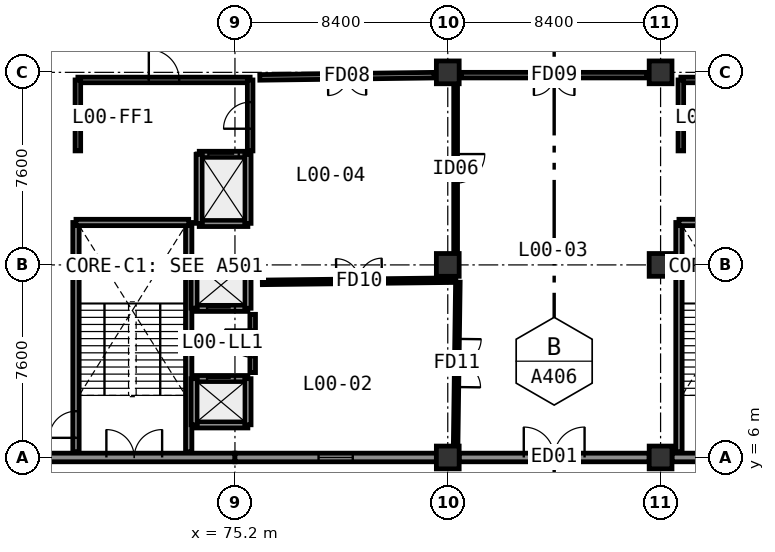
"""IFC4 building model, lengths in metres.
Left out: names, types, materials, properties, quantities, classifications, styles, units other than length and angle.
Written with IfcOpenShell. Run it as: python <this file> out.ifc"""

import sys

from ifc_helpers import new_model, si_unit, direction, frame, frame_2d, origin, origin_2d, place, context, subcontext, project, spatial, rectangle, extrude, element, fill, save


model = new_model("IFC4")
c1 = context("Model", 3, precision=1e-05, world=origin(), true_north=direction((0.0, 1.0)))
c2 = subcontext(c1, "Body", "Model", "MODEL_VIEW")
j1 = project(units=[si_unit("LENGTHUNIT", "METRE"), si_unit("PLANEANGLEUNIT", "RADIAN")], contexts=[c1])
p1 = place(None, origin())
s1 = spatial("IfcSite", under=j1, at=p1, CompositionType="ELEMENT")
p2 = place(p1, origin())
s2 = spatial("IfcBuilding", under=s1, at=p2, CompositionType="ELEMENT")
p3 = place(p2, origin())
s3 = spatial("IfcBuildingStorey", under=s2, at=p3, CompositionType="ELEMENT", Elevation=0.0)
for number, where, z_axis, x_axis in (
    (1, (83.6, 6.0, 0.0), (0.0, 0.0, 1.0), (1.0, 0.0, 0.0)),
    (2, (92.0, 6.0, 0.0), (0.0, 0.0, 1.0), (1.0, 0.0, 0.0)),
    (3, (83.6, 13.6, 0.0), (0.0, 0.0, 1.0), (1.0, 0.0, 0.0)),
    (4, (92.0, 13.6, 0.0), (0.0, 0.0, 1.0), (1.0, 0.0, 0.0)),
    (5, (83.6, 21.2, 0.0), (0.0, 0.0, 1.0), (1.0, 0.0, 0.0)),
    (6, (92.0, 21.2, 0.0), (0.0, 0.0, 1.0), (1.0, 0.0, 0.0)),
):
    element("IfcColumn", number, at=place(p3, frame(where, z_axis=z_axis, x_axis=x_axis)), inside=s3, PredefinedType="COLUMN", context=c2, shape_type="SweptSolid", body=[
        extrude(rectangle(XDim=0.9, YDim=0.9, at=origin_2d()), origin(), (0.0, 0.0, 1.0), 4.8),
    ])
p4 = place(p3, frame((67.25, 6.0, 0.0), z_axis=(0.0, 0.0, 1.0), x_axis=(1.0, 0.0, 0.0)))
e7 = element("IfcWall", 7, at=p4, inside=s3, PredefinedType="SOLIDWALL", context=c2, shape_type="SweptSolid", body=[
    extrude(rectangle(XDim=7.95, YDim=0.34, at=frame_2d((3.975, 0.0))), origin(), (0.0, 0.0, 1.0), 4.5),
])
p5 = place(p4, frame((2.875, 0.0, 0.0)))
e8 = element("IfcOpeningElement", 8, at=p5, cuts=e7, PredefinedType="OPENING", context=c2, shape_type="SweptSolid", body=[
    extrude(rectangle(XDim=2.2, YDim=2.4, at=frame_2d((1.1, 1.2))), frame((0.0, 0.18, 0.0), z_axis=(0.0, -1.0, 0.0), x_axis=(1.0, 0.0, 0.0)), (0.0, 0.0, 1.0), 0.36),
])
p6 = place(p3, frame((75.2, 6.0, 0.0), z_axis=(0.0, 0.0, 1.0), x_axis=(1.0, 0.0, 0.0)))
e9 = element("IfcWall", 9, at=p6, inside=s3, PredefinedType="SOLIDWALL", context=c2, shape_type="SweptSolid", body=[
    extrude(rectangle(XDim=7.95, YDim=0.34, at=frame_2d((3.975, 0.0))), origin(), (0.0, 0.0, 1.0), 4.5),
])
p7 = place(p6, frame((3.3, 0.0, 0.95)))
e10 = element("IfcOpeningElement", 10, at=p7, cuts=e9, PredefinedType="OPENING", context=c2, shape_type="SweptSolid", body=[
    extrude(rectangle(XDim=1.35, YDim=1.5, at=frame_2d((0.675, 0.75))), frame((0.0, 0.18, 0.0), z_axis=(0.0, -1.0, 0.0), x_axis=(1.0, 0.0, 0.0)), (0.0, 0.0, 1.0), 0.36),
])
p8 = place(p3, frame((84.05, 6.0, 0.0), z_axis=(0.0, 0.0, 1.0), x_axis=(1.0, 0.0, 0.0)))
e11 = element("IfcWall", 11, at=p8, inside=s3, PredefinedType="SOLIDWALL", context=c2, shape_type="SweptSolid", body=[
    extrude(rectangle(XDim=7.5, YDim=0.34, at=frame_2d((3.75, 0.0))), origin(), (0.0, 0.0, 1.0), 4.047),
])
p9 = place(p8, frame((2.55, 0.0, 0.0)))
e12 = element("IfcOpeningElement", 12, at=p9, cuts=e11, PredefinedType="OPENING", context=c2, shape_type="SweptSolid", body=[
    extrude(rectangle(XDim=2.4, YDim=2.4, at=frame_2d((1.2, 1.2))), frame((0.0, 0.18, 0.0), z_axis=(0.0, -1.0, 0.0), x_axis=(1.0, 0.0, 0.0)), (0.0, 0.0, 1.0), 0.36),
])
p10 = place(p3, frame((92.45, 6.0, 0.0), z_axis=(0.0, 0.0, 1.0), x_axis=(1.0, 0.0, 0.0)))
e13 = element("IfcWall", 13, at=p10, inside=s3, PredefinedType="SOLIDWALL", context=c2, shape_type="SweptSolid", body=[
    extrude(rectangle(XDim=7.5, YDim=0.34, at=frame_2d((3.75, 0.0))), origin(), (0.0, 0.0, 1.0), 4.5),
])
p11 = place(p10, frame((2.65, 0.0, 0.0)))
e14 = element("IfcOpeningElement", 14, at=p11, cuts=e13, PredefinedType="OPENING", context=c2, shape_type="SweptSolid", body=[
    extrude(rectangle(XDim=2.2, YDim=2.4, at=frame_2d((1.1, 1.2))), frame((0.0, 0.18, 0.0), z_axis=(0.0, -1.0, 0.0), x_axis=(1.0, 0.0, 0.0)), (0.0, 0.0, 1.0), 0.36),
])
p12 = place(p3, frame((68.925, 6.225, 0.0), z_axis=(0.0, 0.0, 1.0), x_axis=(0.0, 1.0, 0.0)))
e15 = element("IfcWall", 15, at=p12, inside=s3, PredefinedType="SHEAR", context=c2, shape_type="SweptSolid", body=[
    extrude(rectangle(XDim=9.05, YDim=0.25, at=frame_2d((4.525, 0.0))), origin(), (0.0, 0.0, 1.0), 4.52),
])
p13 = place(p12, frame((0.55, 0.0, 0.0)))
e16 = element("IfcOpeningElement", 16, at=p13, cuts=e15, PredefinedType="OPENING", context=c2, shape_type="SweptSolid", body=[
    extrude(rectangle(XDim=1.05, YDim=2.1, at=frame_2d((0.525, 1.05))), frame((0.0, 0.135, 0.0), z_axis=(0.0, -1.0, 0.0), x_axis=(1.0, 0.0, 0.0)), (0.0, 0.0, 1.0), 0.27),
])
p14 = place(p3, frame((73.375, 6.225, 0.0), z_axis=(0.0, 0.0, 1.0), x_axis=(0.0, 1.0, 0.0)))
e17 = element("IfcWall", 17, at=p14, inside=s3, PredefinedType="SHEAR", context=c2, shape_type="SweptSolid", body=[
    extrude(rectangle(XDim=9.05, YDim=0.25, at=frame_2d((4.525, 0.0))), origin(), (0.0, 0.0, 1.0), 4.52),
])
p15 = place(p3, frame((68.925, 15.275, 0.0), z_axis=(0.0, 0.0, 1.0), x_axis=(1.0, 0.0, 0.0)))
e18 = element("IfcWall", 18, at=p15, inside=s3, PredefinedType="SHEAR", context=c2, shape_type="SweptSolid", body=[
    extrude(rectangle(XDim=4.45, YDim=0.25, at=frame_2d((2.225, 0.0))), origin(), (0.0, 0.0, 1.0), 4.52),
])
p16 = place(p3, frame((69.0, 20.9, 0.0), z_axis=(0.0, 0.0, 1.0), x_axis=(1.0, 0.0, 0.0)))
e19 = element("IfcWall", 19, at=p16, inside=s3, PredefinedType="SOLIDWALL", context=c2, shape_type="SweptSolid", body=[
    extrude(rectangle(XDim=6.8, YDim=0.22, at=frame_2d((3.4, 0.0))), origin(), (0.0, 0.0, 1.0), 4.5),
])
p17 = place(p16, frame((2.8, 0.0, 0.0)))
e20 = element("IfcOpeningElement", 20, at=p17, cuts=e19, PredefinedType="OPENING", context=c2, shape_type="SweptSolid", body=[
    extrude(rectangle(XDim=1.2, YDim=2.1, at=frame_2d((0.6, 1.05))), frame((0.0, 0.12, 0.0), z_axis=(0.0, -1.0, 0.0), x_axis=(1.0, 0.0, 0.0)), (0.0, 0.0, 1.0), 0.24),
])
p18 = place(p3, frame((69.0, 18.1, 0.0), z_axis=(0.0, 0.0, 1.0), x_axis=(0.0, 1.0, 0.0)))
e21 = element("IfcWall", 21, at=p18, inside=s3, PredefinedType="SOLIDWALL", context=c2, shape_type="SweptSolid", body=[
    extrude(rectangle(XDim=2.8, YDim=0.22, at=frame_2d((1.4, 0.0))), origin(), (0.0, 0.0, 1.0), 4.5),
])
p19 = place(p3, frame((75.8, 18.1, 0.0), z_axis=(0.0, 0.0, 1.0), x_axis=(0.0, 1.0, 0.0)))
e22 = element("IfcWall", 22, at=p19, inside=s3, PredefinedType="SOLIDWALL", context=c2, shape_type="SweptSolid", body=[
    extrude(rectangle(XDim=2.8, YDim=0.22, at=frame_2d((1.4, 0.0))), origin(), (0.0, 0.0, 1.0), 4.5),
])
p20 = place(p19, frame((0.875, 0.0, 0.0)))
e23 = element("IfcOpeningElement", 23, at=p20, cuts=e22, PredefinedType="OPENING", context=c2, shape_type="SweptSolid", body=[
    extrude(rectangle(XDim=1.05, YDim=2.1, at=frame_2d((0.525, 1.05))), frame((0.0, 0.12, 0.0), z_axis=(0.0, -1.0, 0.0), x_axis=(1.0, 0.0, 0.0)), (0.0, 0.0, 1.0), 0.24),
])
p21 = place(p3, frame((75.9, 9.35, 0.0), z_axis=(0.0, 0.0, 1.0), x_axis=(0.0, 1.0, 0.0)))
e24 = element("IfcWall", 24, at=p21, inside=s3, PredefinedType="SOLIDWALL", context=c2, shape_type="SweptSolid", body=[
    extrude(rectangle(XDim=2.3, YDim=0.22, at=frame_2d((1.15, 0.0))), origin(), (0.0, 0.0, 1.0), 4.5),
])
p22 = place(p21, frame((0.6, 0.0, 0.0)))
e25 = element("IfcOpeningElement", 25, at=p22, cuts=e24, PredefinedType="OPENING", context=c2, shape_type="SweptSolid", body=[
    extrude(rectangle(XDim=1.1, YDim=2.1, at=frame_2d((0.55, 1.05))), frame((0.0, 0.12, 0.0), z_axis=(0.0, -1.0, 0.0), x_axis=(1.0, 0.0, 0.0)), (0.0, 0.0, 1.0), 0.24),
])
p23 = place(p3, frame((73.59, 7.29, 0.0), z_axis=(0.0, 0.0, 1.0), x_axis=(1.0, 0.0, 0.0)))
e26 = element("IfcWall", 26, at=p23, inside=s3, PredefinedType="SHEAR", context=c2, shape_type="SweptSolid", body=[
    extrude(rectangle(XDim=2.12, YDim=0.25, at=frame_2d((1.06, 0.0))), origin(), (0.0, 0.0, 1.0), 4.52),
])
p24 = place(p3, frame((73.59, 9.11, 0.0), z_axis=(0.0, 0.0, 1.0), x_axis=(1.0, 0.0, 0.0)))
e27 = element("IfcWall", 27, at=p24, inside=s3, PredefinedType="SHEAR", context=c2, shape_type="SweptSolid", body=[
    extrude(rectangle(XDim=2.12, YDim=0.25, at=frame_2d((1.06, 0.0))), origin(), (0.0, 0.0, 1.0), 4.52),
])
p25 = place(p24, frame((0.51, 0.0, 0.0)))
e28 = element("IfcOpeningElement", 28, at=p25, cuts=e27, PredefinedType="OPENING", context=c2, shape_type="SweptSolid", body=[
    extrude(rectangle(XDim=1.1, YDim=2.15, at=frame_2d((0.55, 1.075))), frame((0.0, 0.135, 0.0), z_axis=(0.0, -1.0, 0.0), x_axis=(1.0, 0.0, 0.0)), (0.0, 0.0, 1.0), 0.27),
])
for number, where, z_axis, x_axis in (
    (29, (73.59, 7.29, 0.0), (0.0, 0.0, 1.0), (0.0, 1.0, 0.0)),
    (30, (75.71, 7.29, 0.0), (0.0, 0.0, 1.0), (0.0, 1.0, 0.0)),
):
    element("IfcWall", number, at=place(p3, frame(where, z_axis=z_axis, x_axis=x_axis)), inside=s3, PredefinedType="SHEAR", context=c2, shape_type="SweptSolid", body=[
        extrude(rectangle(XDim=1.82, YDim=0.25, at=frame_2d((0.91, 0.0))), origin(), (0.0, 0.0, 1.0), 4.52),
    ])
p26 = place(p3, frame((73.59, 11.89, 0.0), z_axis=(0.0, 0.0, 1.0), x_axis=(1.0, 0.0, 0.0)))
e31 = element("IfcWall", 31, at=p26, inside=s3, PredefinedType="SHEAR", context=c2, shape_type="SweptSolid", body=[
    extrude(rectangle(XDim=2.12, YDim=0.25, at=frame_2d((1.06, 0.0))), origin(), (0.0, 0.0, 1.0), 4.52),
])
p27 = place(p26, frame((0.51, 0.0, 0.0)))
e32 = element("IfcOpeningElement", 32, at=p27, cuts=e31, PredefinedType="OPENING", context=c2, shape_type="SweptSolid", body=[
    extrude(rectangle(XDim=1.1, YDim=2.15, at=frame_2d((0.55, 1.075))), frame((0.0, 0.135, 0.0), z_axis=(0.0, -1.0, 0.0), x_axis=(1.0, 0.0, 0.0)), (0.0, 0.0, 1.0), 0.27),
])
p28 = place(p3, frame((73.59, 13.71, 0.0), z_axis=(0.0, 0.0, 1.0), x_axis=(1.0, 0.0, 0.0)))
e33 = element("IfcWall", 33, at=p28, inside=s3, PredefinedType="SHEAR", context=c2, shape_type="SweptSolid", body=[
    extrude(rectangle(XDim=2.12, YDim=0.25, at=frame_2d((1.06, 0.0))), origin(), (0.0, 0.0, 1.0), 4.52),
])
for number, where, z_axis, x_axis in (
    (34, (73.59, 11.89, 0.0), (0.0, 0.0, 1.0), (0.0, 1.0, 0.0)),
    (35, (75.71, 11.89, 0.0), (0.0, 0.0, 1.0), (0.0, 1.0, 0.0)),
):
    element("IfcWall", number, at=place(p3, frame(where, z_axis=z_axis, x_axis=x_axis)), inside=s3, PredefinedType="SHEAR", context=c2, shape_type="SweptSolid", body=[
        extrude(rectangle(XDim=1.82, YDim=0.25, at=frame_2d((0.91, 0.0))), origin(), (0.0, 0.0, 1.0), 4.52),
    ])
p29 = place(p3, frame((73.79, 15.24, 0.0), z_axis=(0.0, 0.0, 1.0), x_axis=(1.0, 0.0, 0.0)))
e36 = element("IfcWall", 36, at=p29, inside=s3, PredefinedType="SHEAR", context=c2, shape_type="SweptSolid", body=[
    extrude(rectangle(XDim=1.92, YDim=0.25, at=frame_2d((0.96, 0.0))), origin(), (0.0, 0.0, 1.0), 4.52),
])
p30 = place(p3, frame((73.79, 17.96, 0.0), z_axis=(0.0, 0.0, 1.0), x_axis=(1.0, 0.0, 0.0)))
e37 = element("IfcWall", 37, at=p30, inside=s3, PredefinedType="SHEAR", context=c2, shape_type="SweptSolid", body=[
    extrude(rectangle(XDim=1.92, YDim=0.25, at=frame_2d((0.96, 0.0))), origin(), (0.0, 0.0, 1.0), 4.52),
])
p31 = place(p30, frame((0.36, 0.0, 0.0)))
e38 = element("IfcOpeningElement", 38, at=p31, cuts=e37, PredefinedType="OPENING", context=c2, shape_type="SweptSolid", body=[
    extrude(rectangle(XDim=1.2, YDim=2.2, at=frame_2d((0.6, 1.1))), frame((0.0, 0.135, 0.0), z_axis=(0.0, -1.0, 0.0), x_axis=(1.0, 0.0, 0.0)), (0.0, 0.0, 1.0), 0.27),
])
for number, where, z_axis, x_axis in (
    (39, (73.79, 15.24, 0.0), (0.0, 0.0, 1.0), (0.0, 1.0, 0.0)),
    (40, (75.71, 15.24, 0.0), (0.0, 0.0, 1.0), (0.0, 1.0, 0.0)),
):
    element("IfcWall", number, at=place(p3, frame(where, z_axis=z_axis, x_axis=x_axis)), inside=s3, PredefinedType="SHEAR", context=c2, shape_type="SweptSolid", body=[
        extrude(rectangle(XDim=2.72, YDim=0.25, at=frame_2d((1.36, 0.0))), origin(), (0.0, 0.0, 1.0), 4.52),
    ])
p32 = place(p3, frame((92.725, 6.225, 0.0), z_axis=(0.0, 0.0, 1.0), x_axis=(0.0, 1.0, 0.0)))
e41 = element("IfcWall", 41, at=p32, inside=s3, PredefinedType="SHEAR", context=c2, shape_type="SweptSolid", body=[
    extrude(rectangle(XDim=9.05, YDim=0.25, at=frame_2d((4.525, 0.0))), origin(), (0.0, 0.0, 1.0), 4.52),
])
p33 = place(p3, frame((92.725, 15.275, 0.0), z_axis=(0.0, 0.0, 1.0), x_axis=(1.0, 0.0, 0.0)))
e42 = element("IfcWall", 42, at=p33, inside=s3, PredefinedType="SHEAR", context=c2, shape_type="SweptSolid", body=[
    extrude(rectangle(XDim=4.45, YDim=0.25, at=frame_2d((2.225, 0.0))), origin(), (0.0, 0.0, 1.0), 4.52),
])
p34 = place(p3, frame((92.8, 20.9, 0.0), z_axis=(0.0, 0.0, 1.0), x_axis=(1.0, 0.0, 0.0)))
e43 = element("IfcWall", 43, at=p34, inside=s3, PredefinedType="SOLIDWALL", context=c2, shape_type="SweptSolid", body=[
    extrude(rectangle(XDim=6.8, YDim=0.22, at=frame_2d((3.4, 0.0))), origin(), (0.0, 0.0, 1.0), 4.5),
])
p35 = place(p34, frame((2.8, 0.0, 0.0)))
e44 = element("IfcOpeningElement", 44, at=p35, cuts=e43, PredefinedType="OPENING", context=c2, shape_type="SweptSolid", body=[
    extrude(rectangle(XDim=1.2, YDim=2.1, at=frame_2d((0.6, 1.05))), frame((0.0, 0.12, 0.0), z_axis=(0.0, -1.0, 0.0), x_axis=(1.0, 0.0, 0.0)), (0.0, 0.0, 1.0), 0.24),
])
p36 = place(p3, frame((92.8, 18.1, 0.0), z_axis=(0.0, 0.0, 1.0), x_axis=(0.0, 1.0, 0.0)))
e45 = element("IfcWall", 45, at=p36, inside=s3, PredefinedType="SOLIDWALL", context=c2, shape_type="SweptSolid", body=[
    extrude(rectangle(XDim=2.8, YDim=0.22, at=frame_2d((1.4, 0.0))), origin(), (0.0, 0.0, 1.0), 4.5),
])
p37 = place(p3, frame((76.28, 12.911, 0.0), z_axis=(0.0, 0.0, 1.0), x_axis=(0.999933465536, 0.01153535874, 0.0)))
e46 = element("IfcWall", 46, at=p37, inside=s3, PredefinedType="PARTITIONING", context=c2, shape_type="SweptSolid", body=[
    extrude(rectangle(XDim=7.64, YDim=0.18, at=frame_2d((3.82, 0.0))), origin(), (0.0, 0.0, 1.0), 4.5),
])
p38 = place(p37, frame((2.92, 0.0, 0.0)))
e47 = element("IfcOpeningElement", 47, at=p38, cuts=e46, PredefinedType="OPENING", context=c2, shape_type="SweptSolid", body=[
    extrude(rectangle(XDim=1.8, YDim=2.2, at=frame_2d((0.9, 1.1))), frame((0.0, 0.1, 0.0), z_axis=(0.0, -1.0, 0.0), x_axis=(1.0, 0.0, 0.0)), (0.0, 0.0, 1.0), 0.2),
])
p39 = place(p3, frame((83.999, 12.92, 0.0), z_axis=(0.0, 0.0, 1.0), x_axis=(-0.013736649608, -0.999905647778, 0.0)))
e48 = element("IfcWall", 48, at=p39, inside=s3, PredefinedType="PARTITIONING", context=c2, shape_type="SweptSolid", body=[
    extrude(rectangle(XDim=6.38, YDim=0.18, at=frame_2d((3.19, 0.0))), origin(), (0.0, 0.0, 1.0), 4.5),
])
p40 = place(p39, frame((2.24, 0.0, 0.0)))
e49 = element("IfcOpeningElement", 49, at=p40, cuts=e48, PredefinedType="OPENING", context=c2, shape_type="SweptSolid", body=[
    extrude(rectangle(XDim=1.9, YDim=2.2, at=frame_2d((0.95, 1.1))), frame((0.0, 0.1, 0.0), z_axis=(0.0, -1.0, 0.0), x_axis=(1.0, 0.0, 0.0)), (0.0, 0.0, 1.0), 0.2),
])
p41 = place(p3, frame((83.06, 21.089, 0.0), z_axis=(0.0, 0.0, 1.0), x_axis=(-0.99991794977, -0.012809907373, 0.0)))
e50 = element("IfcWall", 50, at=p41, inside=s3, PredefinedType="SOLIDWALL", context=c2, shape_type="SweptSolid", body=[
    extrude(rectangle(XDim=6.88, YDim=0.22, at=frame_2d((3.44, 0.0))), origin(), (0.0, 0.0, 1.0), 3.659),
])
p42 = place(p41, frame((2.69, 0.0, 0.0)))
e51 = element("IfcOpeningElement", 51, at=p42, cuts=e50, PredefinedType="OPENING", context=c2, shape_type="SweptSolid", body=[
    extrude(rectangle(XDim=1.5, YDim=2.15, at=frame_2d((0.75, 1.075))), frame((0.0, 0.12, 0.0), z_axis=(0.0, -1.0, 0.0), x_axis=(1.0, 0.0, 0.0)), (0.0, 0.0, 1.0), 0.24),
])
p43 = place(p3, frame((91.46, 21.09, 0.0), z_axis=(0.0, 0.0, 1.0), x_axis=(-1.0, 0.0, 0.0)))
e52 = element("IfcWall", 52, at=p43, inside=s3, PredefinedType="SOLIDWALL", context=c2, shape_type="SweptSolid", body=[
    extrude(rectangle(XDim=7.32, YDim=0.22, at=frame_2d((3.66, 0.0))), origin(), (0.0, 0.0, 1.0), 3.81),
])
p44 = place(p43, frame((2.86, 0.0, 0.0)))
e53 = element("IfcOpeningElement", 53, at=p44, cuts=e52, PredefinedType="OPENING", context=c2, shape_type="SweptSolid", body=[
    extrude(rectangle(XDim=1.6, YDim=2.2, at=frame_2d((0.8, 1.1))), frame((0.0, 0.12, 0.0), z_axis=(0.0, -1.0, 0.0), x_axis=(1.0, 0.0, 0.0)), (0.0, 0.0, 1.0), 0.24),
])
p45 = place(p3, frame((83.91, 20.66, 0.0), z_axis=(0.0, 0.0, 1.0), x_axis=(0.0, -1.0, 0.0)))
e54 = element("IfcWall", 54, at=p45, inside=s3, PredefinedType="PARTITIONING", context=c2, shape_type="SweptSolid", body=[
    extrude(rectangle(XDim=6.52, YDim=0.15, at=frame_2d((3.26, 0.0))), origin(), (0.0, 0.0, 1.0), 4.5),
])
p46 = place(p45, frame((2.685, 0.0, 0.0)))
e55 = element("IfcOpeningElement", 55, at=p46, cuts=e54, PredefinedType="OPENING", context=c2, shape_type="SweptSolid", body=[
    extrude(rectangle(XDim=1.15, YDim=2.12, at=frame_2d((0.575, 1.06))), frame((0.0, 0.085, 0.0), z_axis=(0.0, -1.0, 0.0), x_axis=(1.0, 0.0, 0.0)), (0.0, 0.0, 1.0), 0.17),
])
p47 = place(p5, frame((2.2, 0.0, 0.0), z_axis=(0.0, 0.0, 1.0), x_axis=(-1.0, 0.0, 0.0)))
e56 = element("IfcDoor", 56, at=p47, inside=s3, OperationType="DOUBLE_DOOR_SINGLE_SWING", PredefinedType="DOOR", context=c2, shape_type="SweptSolid", body=[
    extrude(rectangle(XDim=2.2, YDim=2.4, at=frame_2d((1.1, 1.2))), frame((0.0, 0.025, 0.0), z_axis=(0.0, -1.0, 0.0), x_axis=(1.0, 0.0, 0.0)), (0.0, 0.0, 1.0), 0.05),
])
fill(e8, e56)
p48 = place(p7, origin())
e57 = element("IfcWindow", 57, at=p48, inside=s3, PartitioningType="SINGLE_PANEL", PredefinedType="WINDOW", context=c2, shape_type="SweptSolid", body=[
    extrude(rectangle(XDim=1.35, YDim=1.5, at=frame_2d((0.675, 0.75))), frame((0.0, 0.03, 0.0), z_axis=(0.0, -1.0, 0.0), x_axis=(1.0, 0.0, 0.0)), (0.0, 0.0, 1.0), 0.06),
])
fill(e10, e57)
p49 = place(p9, frame((2.4, 0.0, 0.0), z_axis=(0.0, 0.0, 1.0), x_axis=(-1.0, 0.0, 0.0)))
e58 = element("IfcDoor", 58, at=p49, inside=s3, OperationType="DOUBLE_DOOR_SINGLE_SWING", PredefinedType="DOOR", context=c2, shape_type="SweptSolid", body=[
    extrude(rectangle(XDim=2.4, YDim=2.4, at=frame_2d((1.2, 1.2))), frame((0.0, 0.025, 0.0), z_axis=(0.0, -1.0, 0.0), x_axis=(1.0, 0.0, 0.0)), (0.0, 0.0, 1.0), 0.05),
])
fill(e12, e58)
p50 = place(p13, origin())
e59 = element("IfcDoor", 59, at=p50, inside=s3, OperationType="SINGLE_SWING_LEFT", PredefinedType="DOOR", context=c2, shape_type="SweptSolid", body=[
    extrude(rectangle(XDim=1.05, YDim=2.1, at=frame_2d((0.525, 1.05))), frame((0.0, 0.025, 0.0), z_axis=(0.0, -1.0, 0.0), x_axis=(1.0, 0.0, 0.0)), (0.0, 0.0, 1.0), 0.05),
])
fill(e16, e59)
p51 = place(p17, origin())
e60 = element("IfcDoor", 60, at=p51, inside=s3, OperationType="SINGLE_SWING_LEFT", PredefinedType="DOOR", context=c2, shape_type="SweptSolid", body=[
    extrude(rectangle(XDim=1.2, YDim=2.1, at=frame_2d((0.6, 1.05))), frame((0.0, 0.025, 0.0), z_axis=(0.0, -1.0, 0.0), x_axis=(1.0, 0.0, 0.0)), (0.0, 0.0, 1.0), 0.05),
])
fill(e20, e60)
p52 = place(p20, origin())
e61 = element("IfcDoor", 61, at=p52, inside=s3, OperationType="SINGLE_SWING_LEFT", PredefinedType="DOOR", context=c2, shape_type="SweptSolid", body=[
    extrude(rectangle(XDim=1.05, YDim=2.1, at=frame_2d((0.525, 1.05))), frame((0.0, 0.025, 0.0), z_axis=(0.0, -1.0, 0.0), x_axis=(1.0, 0.0, 0.0)), (0.0, 0.0, 1.0), 0.05),
])
fill(e23, e61)
p53 = place(p22, origin())
e62 = element("IfcDoor", 62, at=p53, inside=s3, OperationType="SINGLE_SWING_RIGHT", PredefinedType="DOOR", context=c2, shape_type="SweptSolid", body=[
    extrude(rectangle(XDim=1.1, YDim=2.1, at=frame_2d((0.55, 1.05))), frame((0.0, 0.025, 0.0), z_axis=(0.0, -1.0, 0.0), x_axis=(1.0, 0.0, 0.0)), (0.0, 0.0, 1.0), 0.05),
])
fill(e25, e62)
p54 = place(p25, origin())
e63 = element("IfcDoor", 63, at=p54, inside=s3, OperationType="SLIDING_TO_LEFT", PredefinedType="DOOR", context=c2, shape_type="SweptSolid", body=[
    extrude(rectangle(XDim=1.1, YDim=2.15, at=frame_2d((0.55, 1.075))), frame((0.0, 0.025, 0.0), z_axis=(0.0, -1.0, 0.0), x_axis=(1.0, 0.0, 0.0)), (0.0, 0.0, 1.0), 0.05),
])
fill(e28, e63)
p55 = place(p27, origin())
e64 = element("IfcDoor", 64, at=p55, inside=s3, OperationType="SLIDING_TO_LEFT", PredefinedType="DOOR", context=c2, shape_type="SweptSolid", body=[
    extrude(rectangle(XDim=1.1, YDim=2.15, at=frame_2d((0.55, 1.075))), frame((0.0, 0.025, 0.0), z_axis=(0.0, -1.0, 0.0), x_axis=(1.0, 0.0, 0.0)), (0.0, 0.0, 1.0), 0.05),
])
fill(e32, e64)
p56 = place(p31, origin())
e65 = element("IfcDoor", 65, at=p56, inside=s3, OperationType="SLIDING_TO_LEFT", PredefinedType="DOOR", context=c2, shape_type="SweptSolid", body=[
    extrude(rectangle(XDim=1.2, YDim=2.2, at=frame_2d((0.6, 1.1))), frame((0.0, 0.025, 0.0), z_axis=(0.0, -1.0, 0.0), x_axis=(1.0, 0.0, 0.0)), (0.0, 0.0, 1.0), 0.05),
])
fill(e38, e65)
p57 = place(p38, origin())
e66 = element("IfcDoor", 66, at=p57, inside=s3, OperationType="DOUBLE_DOOR_SINGLE_SWING", PredefinedType="DOOR", context=c2, shape_type="SweptSolid", body=[
    extrude(rectangle(XDim=1.8, YDim=2.2, at=frame_2d((0.9, 1.1))), frame((0.0, 0.025, 0.0), z_axis=(0.0, -1.0, 0.0), x_axis=(1.0, 0.0, 0.0)), (0.0, 0.0, 1.0), 0.05),
])
fill(e47, e66)
p58 = place(p40, origin())
e67 = element("IfcDoor", 67, at=p58, inside=s3, OperationType="DOUBLE_DOOR_SINGLE_SWING", PredefinedType="DOOR", context=c2, shape_type="SweptSolid", body=[
    extrude(rectangle(XDim=1.9, YDim=2.2, at=frame_2d((0.95, 1.1))), frame((0.0, 0.025, 0.0), z_axis=(0.0, -1.0, 0.0), x_axis=(1.0, 0.0, 0.0)), (0.0, 0.0, 1.0), 0.05),
])
fill(e49, e67)
p59 = place(p42, origin())
e68 = element("IfcDoor", 68, at=p59, inside=s3, OperationType="DOUBLE_DOOR_SINGLE_SWING", PredefinedType="DOOR", context=c2, shape_type="SweptSolid", body=[
    extrude(rectangle(XDim=1.5, YDim=2.15, at=frame_2d((0.75, 1.075))), frame((0.0, 0.025, 0.0), z_axis=(0.0, -1.0, 0.0), x_axis=(1.0, 0.0, 0.0)), (0.0, 0.0, 1.0), 0.05),
])
fill(e51, e68)
p60 = place(p44, origin())
e69 = element("IfcDoor", 69, at=p60, inside=s3, OperationType="DOUBLE_DOOR_SINGLE_SWING", PredefinedType="DOOR", context=c2, shape_type="SweptSolid", body=[
    extrude(rectangle(XDim=1.6, YDim=2.2, at=frame_2d((0.8, 1.1))), frame((0.0, 0.025, 0.0), z_axis=(0.0, -1.0, 0.0), x_axis=(1.0, 0.0, 0.0)), (0.0, 0.0, 1.0), 0.05),
])
fill(e53, e69)
p61 = place(p46, origin())
e70 = element("IfcDoor", 70, at=p61, inside=s3, OperationType="SINGLE_SWING_LEFT", PredefinedType="DOOR", context=c2, shape_type="SweptSolid", body=[
    extrude(rectangle(XDim=1.15, YDim=2.12, at=frame_2d((0.575, 1.06))), frame((0.0, 0.025, 0.0), z_axis=(0.0, -1.0, 0.0), x_axis=(1.0, 0.0, 0.0)), (0.0, 0.0, 1.0), 0.05),
])
fill(e55, e70)
save(model, sys.argv[1])
